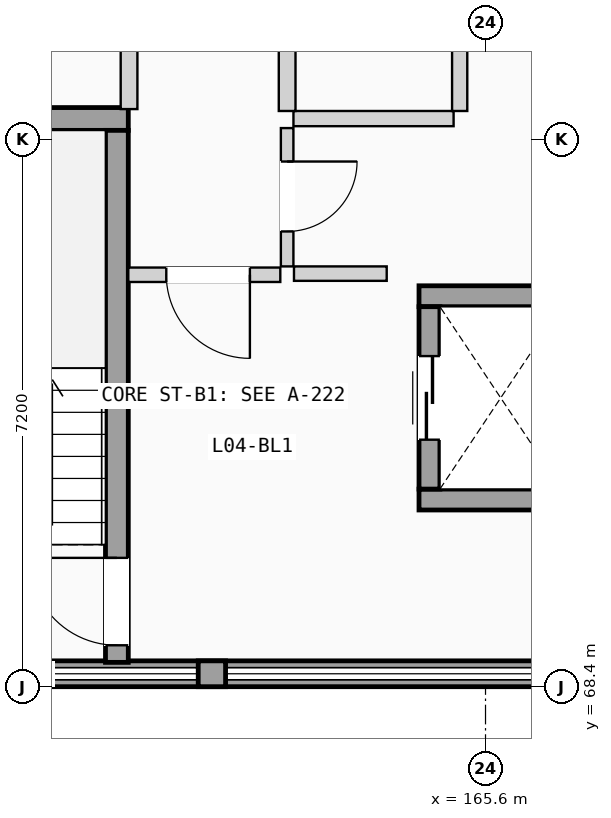
"""IFC4 building model, lengths in metres.
Left out: names, types, materials, properties, quantities, classifications, styles, units other than length and angle.
Written with IfcOpenShell. Run it as: python <this file> out.ifc"""

import sys

from ifc_helpers import new_model, si_unit, direction, frame, frame_2d, origin, place, context, subcontext, project, spatial, rectangle, extrude, element, fill, save


model = new_model("IFC4")
c1 = context("Model", 3, precision=1e-05, world=origin(), true_north=direction((0.0, 1.0)))
c2 = subcontext(c1, "Body", "Model", "MODEL_VIEW")
j1 = project(units=[si_unit("LENGTHUNIT", "METRE"), si_unit("PLANEANGLEUNIT", "RADIAN")], contexts=[c1])
p1 = place(None, origin())
s1 = spatial("IfcSite", under=j1, at=p1, CompositionType="ELEMENT")
p2 = place(p1, origin())
s2 = spatial("IfcBuilding", under=s1, at=p2, CompositionType="ELEMENT")
p3 = place(p2, frame((0.0, 0.0, 15.225)))
s3 = spatial("IfcBuildingStorey", under=s2, at=p3, CompositionType="ELEMENT", Elevation=15.225)
p4 = place(p3, frame((151.2, 68.57, 0.0), z_axis=(0.0, 0.0, 1.0), x_axis=(1.0, 0.0, 0.0)))
e1 = element("IfcWall", 1, at=p4, inside=s3, PredefinedType="SOLIDWALL", context=c2, shape_type="SweptSolid", body=[
    extrude(rectangle(XDim=21.6, YDim=0.34, at=frame_2d((10.8, 0.0))), origin(), (0.0, 0.0, 1.0), 1.11),
])
p5 = place(p3, frame((161.82, 68.57, 1.11), z_axis=(0.0, 0.0, 1.0), x_axis=(1.0, 0.0, 0.0)))
e2 = element("IfcWall", 2, at=p5, inside=s3, PredefinedType="SOLIDWALL", context=c2, shape_type="SweptSolid", body=[
    extrude(rectangle(XDim=0.36, YDim=0.34, at=frame_2d((0.18, 0.0))), origin(), (0.0, 0.0, 1.0), 1.78),
])
p6 = place(p3, frame((156.95, 75.87, 0.0), z_axis=(0.0, 0.0, 1.0), x_axis=(1.0, 0.0, 0.0)))
e3 = element("IfcWall", 3, at=p6, inside=s3, PredefinedType="SHEAR", context=c2, shape_type="SweptSolid", body=[
    extrude(rectangle(XDim=3.95, YDim=0.3, at=frame_2d((1.975, 0.0))), origin(), (0.0, 0.0, 1.0), 2.89),
])
p7 = place(p3, frame((160.75, 68.72, 0.0), z_axis=(0.0, 0.0, 1.0), x_axis=(0.0, 1.0, 0.0)))
e4 = element("IfcWall", 4, at=p7, inside=s3, PredefinedType="SHEAR", context=c2, shape_type="SweptSolid", body=[
    extrude(rectangle(XDim=7.0, YDim=0.3, at=frame_2d((3.5, 0.0))), origin(), (0.0, 0.0, 1.0), 2.89),
])
p8 = place(p7, frame((0.225, 0.0, 0.0)))
e5 = element("IfcOpeningElement", 5, at=p8, cuts=e4, PredefinedType="OPENING", context=c2, shape_type="SweptSolid", body=[
    extrude(rectangle(XDim=1.15, YDim=2.12, at=frame_2d((0.575, 1.06))), frame((0.0, 0.16, 0.0), z_axis=(0.0, -1.0, 0.0), x_axis=(1.0, 0.0, 0.0)), (0.0, 0.0, 1.0), 0.32),
])
for number, where, z_axis, x_axis in (
    (6, (164.725, 70.863, 0.0), (0.0, 0.0, 1.0), (1.0, 0.0, 0.0)),
    (7, (164.725, 73.538, 0.0), (0.0, 0.0, 1.0), (1.0, 0.0, 0.0)),
):
    element("IfcWall", number, at=place(p3, frame(where, z_axis=z_axis, x_axis=x_axis)), inside=s3, PredefinedType="SHEAR", context=c2, shape_type="SweptSolid", body=[
        extrude(rectangle(XDim=2.15, YDim=0.275, at=frame_2d((1.075, 0.0))), origin(), (0.0, 0.0, 1.0), 2.89),
    ])
p9 = place(p3, frame((164.863, 71.0, 0.0), z_axis=(0.0, 0.0, 1.0), x_axis=(0.0, 1.0, 0.0)))
e8 = element("IfcWall", 8, at=p9, inside=s3, PredefinedType="SHEAR", context=c2, shape_type="SweptSolid", body=[
    extrude(rectangle(XDim=2.4, YDim=0.275, at=frame_2d((1.2, 0.0))), origin(), (0.0, 0.0, 1.0), 2.89),
])
p10 = place(p9, frame((0.65, 0.0, 0.0)))
e9 = element("IfcOpeningElement", 9, at=p10, cuts=e8, PredefinedType="OPENING", context=c2, shape_type="SweptSolid", body=[
    extrude(rectangle(XDim=1.1, YDim=2.15, at=frame_2d((0.55, 1.075))), frame((0.0, 0.147, 0.0), z_axis=(0.0, -1.0, 0.0), x_axis=(1.0, 0.0, 0.0)), (0.0, 0.0, 1.0), 0.295),
])
p11 = place(p3, frame((163.08, 73.835, 0.0), z_axis=(0.0, 0.0, 1.0), x_axis=(1.0, 0.0, 0.0)))
e10 = element("IfcWall", 10, at=p11, inside=s3, PredefinedType="PARTITIONING", context=c2, shape_type="SweptSolid", body=[
    extrude(rectangle(XDim=1.22, YDim=0.19, at=frame_2d((0.61, 0.0))), origin(), (0.0, 0.0, 1.0), 2.87),
])
p12 = place(p3, frame((160.9, 73.82, 0.0), z_axis=(0.0, 0.0, 1.0), x_axis=(1.0, 0.0, 0.0)))
e11 = element("IfcWall", 11, at=p12, inside=s3, PredefinedType="PARTITIONING", context=c2, shape_type="SweptSolid", body=[
    extrude(rectangle(XDim=2.0, YDim=0.19, at=frame_2d((1.0, 0.0))), origin(), (0.0, 0.0, 1.0), 2.87),
])
p13 = place(p12, frame((0.5, 0.0, 0.0)))
e12 = element("IfcOpeningElement", 12, at=p13, cuts=e11, PredefinedType="OPENING", context=c2, shape_type="SweptSolid", body=[
    extrude(rectangle(XDim=1.1, YDim=2.12, at=frame_2d((0.55, 1.06))), frame((0.0, 0.105, 0.0), z_axis=(0.0, -1.0, 0.0), x_axis=(1.0, 0.0, 0.0)), (0.0, 0.0, 1.0), 0.21),
])
p14 = place(p3, frame((162.99, 73.93, 0.0), z_axis=(0.0, 0.0, 1.0), x_axis=(0.0, 1.0, 0.0)))
e13 = element("IfcWall", 13, at=p14, inside=s3, PredefinedType="PARTITIONING", context=c2, shape_type="SweptSolid", body=[
    extrude(rectangle(XDim=1.82, YDim=0.165, at=frame_2d((0.91, 0.0))), origin(), (0.0, 0.0, 1.0), 2.87),
])
p15 = place(p14, frame((0.46, 0.0, 0.0)))
e14 = element("IfcOpeningElement", 14, at=p15, cuts=e13, PredefinedType="OPENING", context=c2, shape_type="SweptSolid", body=[
    extrude(rectangle(XDim=0.92, YDim=2.04, at=frame_2d((0.46, 1.02))), frame((0.0, 0.093, 0.0), z_axis=(0.0, -1.0, 0.0), x_axis=(1.0, 0.0, 0.0)), (0.0, 0.0, 1.0), 0.185),
])
p16 = place(p3, frame((163.073, 75.875, 0.0), z_axis=(0.0, 0.0, 1.0), x_axis=(1.0, 0.0, 0.0)))
e15 = element("IfcWall", 15, at=p16, inside=s3, PredefinedType="PLUMBINGWALL", context=c2, shape_type="SweptSolid", body=[
    extrude(rectangle(XDim=2.107, YDim=0.2, at=frame_2d((1.053, 0.0))), origin(), (0.0, 0.0, 1.0), 2.87),
])
p17 = place(p3, frame((160.91, 76.0, 0.0), z_axis=(0.0, 0.0, 1.0), x_axis=(0.0, 1.0, 0.0)))
e16 = element("IfcWall", 16, at=p17, inside=s3, PredefinedType="PLUMBINGWALL", context=c2, shape_type="SweptSolid", body=[
    extrude(rectangle(XDim=4.475, YDim=0.22, at=frame_2d((2.238, 0.0))), origin(), (0.0, 0.0, 1.0), 2.87),
])
p18 = place(p3, frame((162.99, 75.975, 0.0), z_axis=(0.0, 0.0, 1.0), x_axis=(0.0, 1.0, 0.0)))
e17 = element("IfcWall", 17, at=p18, inside=s3, PredefinedType="PLUMBINGWALL", context=c2, shape_type="SweptSolid", body=[
    extrude(rectangle(XDim=4.5, YDim=0.22, at=frame_2d((2.25, 0.0))), origin(), (0.0, 0.0, 1.0), 2.87),
])
p19 = place(p3, frame((165.26, 75.975, 0.0), z_axis=(0.0, 0.0, 1.0), x_axis=(0.0, 1.0, 0.0)))
e18 = element("IfcWall", 18, at=p19, inside=s3, PredefinedType="PLUMBINGWALL", context=c2, shape_type="SweptSolid", body=[
    extrude(rectangle(XDim=4.505, YDim=0.2, at=frame_2d((2.252, 0.0))), origin(), (0.0, 0.0, 1.0), 2.87),
])
p20 = place(p8, origin())
e19 = element("IfcDoor", 19, at=p20, inside=s3, OperationType="SINGLE_SWING_RIGHT", PredefinedType="DOOR", context=c2, shape_type="SweptSolid", body=[
    extrude(rectangle(XDim=1.15, YDim=2.12, at=frame_2d((0.575, 1.06))), frame((0.0, 0.025, 0.0), z_axis=(0.0, -1.0, 0.0), x_axis=(1.0, 0.0, 0.0)), (0.0, 0.0, 1.0), 0.05),
])
fill(e5, e19)
p21 = place(p10, origin())
e20 = element("IfcDoor", 20, at=p21, inside=s3, OperationType="SLIDING_TO_LEFT", PredefinedType="DOOR", context=c2, shape_type="SweptSolid", body=[
    extrude(rectangle(XDim=1.1, YDim=2.15, at=frame_2d((0.55, 1.075))), frame((0.0, 0.025, 0.0), z_axis=(0.0, -1.0, 0.0), x_axis=(1.0, 0.0, 0.0)), (0.0, 0.0, 1.0), 0.05),
])
fill(e9, e20)
p22 = place(p13, frame((1.1, 0.0, 0.0), z_axis=(0.0, 0.0, 1.0), x_axis=(-1.0, 0.0, 0.0)))
e21 = element("IfcDoor", 21, at=p22, inside=s3, OperationType="SINGLE_SWING_RIGHT", PredefinedType="DOOR", context=c2, shape_type="SweptSolid", body=[
    extrude(rectangle(XDim=1.1, YDim=2.12, at=frame_2d((0.55, 1.06))), frame((0.0, 0.025, 0.0), z_axis=(0.0, -1.0, 0.0), x_axis=(1.0, 0.0, 0.0)), (0.0, 0.0, 1.0), 0.05),
])
fill(e12, e21)
p23 = place(p15, frame((0.92, 0.0, 0.0), z_axis=(0.0, 0.0, 1.0), x_axis=(-1.0, 0.0, 0.0)))
e22 = element("IfcDoor", 22, at=p23, inside=s3, OperationType="SINGLE_SWING_RIGHT", PredefinedType="DOOR", context=c2, shape_type="SweptSolid", body=[
    extrude(rectangle(XDim=0.92, YDim=2.04, at=frame_2d((0.46, 1.02))), frame((0.0, 0.025, 0.0), z_axis=(0.0, -1.0, 0.0), x_axis=(1.0, 0.0, 0.0)), (0.0, 0.0, 1.0), 0.05),
])
fill(e14, e22)
save(model, sys.argv[1])
